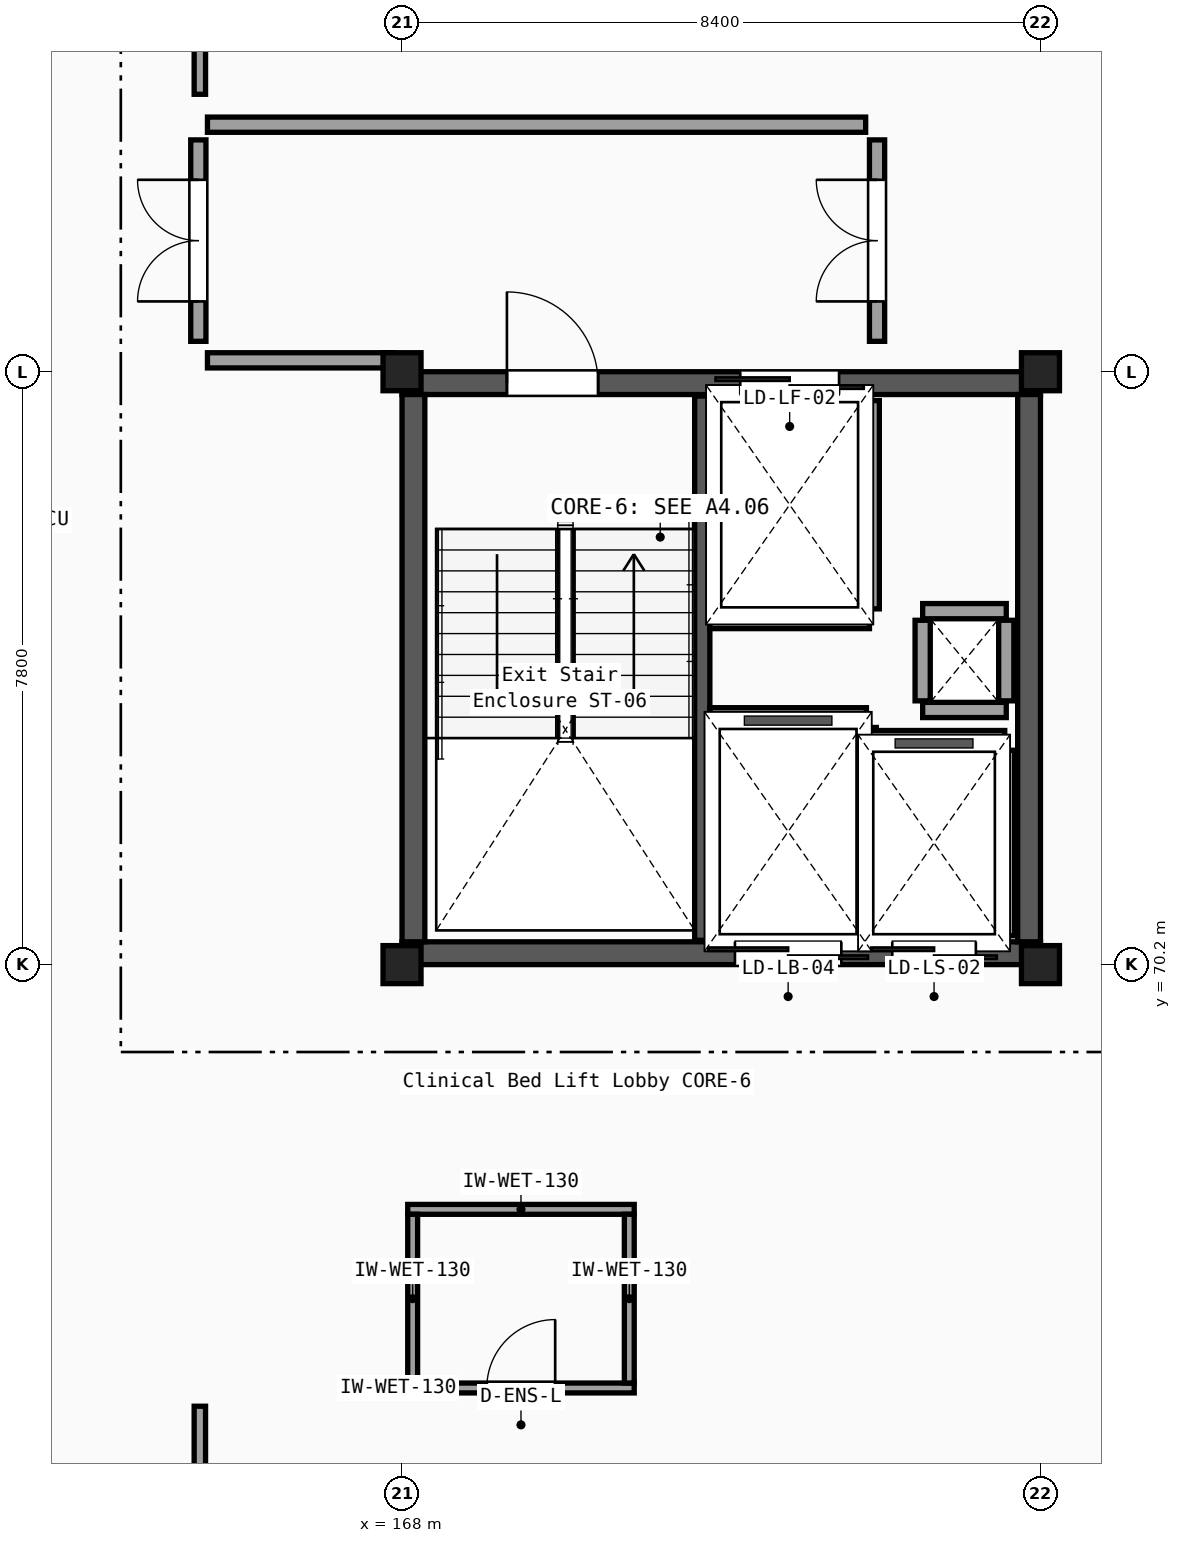
"""IFC4 building model, lengths in metres.
Left out: names, types, materials, properties, quantities, classifications, styles, units other than length and angle.
Written with IfcOpenShell. Run it as: python <this file> out.ifc"""

import sys

from ifc_helpers import new_model, si_unit, direction, frame, frame_2d, origin, origin_2d, place, context, subcontext, project, spatial, rectangle, i_section, extrude, element, fill, save


model = new_model("IFC4")
c1 = context("Model", 3, precision=1e-05, world=origin(), true_north=direction((0.0, 1.0)))
c2 = subcontext(c1, "Body", "Model", "MODEL_VIEW")
j1 = project(units=[si_unit("LENGTHUNIT", "METRE"), si_unit("PLANEANGLEUNIT", "RADIAN")], contexts=[c1])
p1 = place(None, origin())
s1 = spatial("IfcSite", under=j1, at=p1, CompositionType="ELEMENT")
p2 = place(p1, origin())
s2 = spatial("IfcBuilding", under=s1, at=p2, CompositionType="ELEMENT")
p3 = place(p2, frame((0.0, 0.0, 14.85)))
s3 = spatial("IfcBuildingStorey", under=s2, at=p3, CompositionType="ELEMENT", Elevation=14.85)
for number, where, z_axis, x_axis in (
    (1, (168.0, 70.2, 0.0), (0.0, 0.0, 1.0), (1.0, 0.0, 0.0)),
    (2, (168.0, 78.0, 0.0), (0.0, 0.0, 1.0), (1.0, 0.0, 0.0)),
    (3, (176.4, 70.2, 0.0), (0.0, 0.0, 1.0), (1.0, 0.0, 0.0)),
    (4, (176.4, 78.0, 0.0), (0.0, 0.0, 1.0), (1.0, 0.0, 0.0)),
):
    element("IfcColumn", number, at=place(p3, frame(where, z_axis=z_axis, x_axis=x_axis)), inside=s3, PredefinedType="COLUMN", context=c2, shape_type="SweptSolid", body=[
        extrude(i_section(OverallWidth=0.3, OverallDepth=0.5, WebThickness=0.014, FlangeThickness=0.028, FilletRadius=0.027, at=origin_2d()), origin(), (0.0, 0.0, 1.0), 4.05),
    ])
p4 = place(p3, frame((168.0, 70.35, 0.0), z_axis=(0.0, 0.0, 1.0), x_axis=(1.0, 0.0, 0.0)))
e5 = element("IfcWall", 5, at=p4, inside=s3, PredefinedType="SHEAR", context=c2, shape_type="SweptSolid", body=[
    extrude(rectangle(XDim=8.4, YDim=0.3, at=frame_2d((4.2, 0.0))), origin(), (0.0, 0.0, 1.0), 3.81),
])
p5 = place(p4, frame((4.38, 0.0, 0.0)))
e6 = element("IfcOpeningElement", 6, at=p5, cuts=e5, PredefinedType="OPENING", context=c2, shape_type="SweptSolid", body=[
    extrude(rectangle(XDim=1.4, YDim=2.2, at=frame_2d((0.7, 1.1))), frame((0.0, 0.16, 0.0), z_axis=(0.0, -1.0, 0.0), x_axis=(1.0, 0.0, 0.0)), (0.0, 0.0, 1.0), 0.32),
])
p6 = place(p4, frame((6.45, 0.0, 0.0)))
e7 = element("IfcOpeningElement", 7, at=p6, cuts=e5, PredefinedType="OPENING", context=c2, shape_type="SweptSolid", body=[
    extrude(rectangle(XDim=1.1, YDim=2.15, at=frame_2d((0.55, 1.075))), frame((0.0, 0.16, 0.0), z_axis=(0.0, -1.0, 0.0), x_axis=(1.0, 0.0, 0.0)), (0.0, 0.0, 1.0), 0.32),
])
p7 = place(p3, frame((168.0, 77.85, 0.0), z_axis=(0.0, 0.0, 1.0), x_axis=(1.0, 0.0, 0.0)))
e8 = element("IfcWall", 8, at=p7, inside=s3, PredefinedType="SHEAR", context=c2, shape_type="SweptSolid", body=[
    extrude(rectangle(XDim=8.4, YDim=0.3, at=frame_2d((4.2, 0.0))), origin(), (0.0, 0.0, 1.0), 3.81),
])
p8 = place(p7, frame((1.38, 0.0, 0.0)))
e9 = element("IfcOpeningElement", 9, at=p8, cuts=e8, PredefinedType="OPENING", context=c2, shape_type="SweptSolid", body=[
    extrude(rectangle(XDim=1.2, YDim=2.15, at=frame_2d((0.6, 1.075))), frame((0.0, 0.16, 0.0), z_axis=(0.0, -1.0, 0.0), x_axis=(1.0, 0.0, 0.0)), (0.0, 0.0, 1.0), 0.32),
])
p9 = place(p7, frame((4.45, 0.0, 0.0)))
e10 = element("IfcOpeningElement", 10, at=p9, cuts=e8, PredefinedType="OPENING", context=c2, shape_type="SweptSolid", body=[
    extrude(rectangle(XDim=1.3, YDim=2.2, at=frame_2d((0.65, 1.1))), frame((0.0, 0.16, 0.0), z_axis=(0.0, -1.0, 0.0), x_axis=(1.0, 0.0, 0.0)), (0.0, 0.0, 1.0), 0.32),
])
for number, where, z_axis, x_axis in (
    (11, (168.15, 70.5, 0.0), (0.0, 0.0, 1.0), (0.0, 1.0, 0.0)),
    (12, (176.25, 70.5, 0.0), (0.0, 0.0, 1.0), (0.0, 1.0, 0.0)),
):
    element("IfcWall", number, at=place(p3, frame(where, z_axis=z_axis, x_axis=x_axis)), inside=s3, PredefinedType="SHEAR", context=c2, shape_type="SweptSolid", body=[
        extrude(rectangle(XDim=7.2, YDim=0.3, at=frame_2d((3.6, 0.0))), origin(), (0.0, 0.0, 1.0), 3.81),
    ])
p10 = place(p3, frame((171.95, 70.52, 0.0), z_axis=(0.0, 0.0, 1.0), x_axis=(0.0, 1.0, 0.0)))
e13 = element("IfcWall", 13, at=p10, inside=s3, PredefinedType="SHEAR", context=c2, shape_type="SweptSolid", body=[
    extrude(rectangle(XDim=7.16, YDim=0.2, at=frame_2d((3.58, 0.0))), origin(), (0.0, 0.0, 1.0), 3.81),
])
for number, where, z_axis, x_axis in (
    (14, (174.85, 73.55, 0.0), (0.0, 0.0, 1.0), (1.0, 0.0, 0.0)),
    (15, (174.85, 74.85, 0.0), (0.0, 0.0, 1.0), (1.0, 0.0, 0.0)),
):
    element("IfcWall", number, at=place(p3, frame(where, z_axis=z_axis, x_axis=x_axis)), inside=s3, PredefinedType="PARTITIONING", context=c2, shape_type="SweptSolid", body=[
        extrude(rectangle(XDim=1.1, YDim=0.2, at=frame_2d((0.55, 0.0))), origin(), (0.0, 0.0, 1.0), 3.35),
    ])
for number, where, z_axis, x_axis in (
    (16, (174.85, 73.67, 0.0), (0.0, 0.0, 1.0), (0.0, 1.0, 0.0)),
    (17, (175.95, 73.67, 0.0), (0.0, 0.0, 1.0), (0.0, 1.0, 0.0)),
):
    element("IfcWall", number, at=place(p3, frame(where, z_axis=z_axis, x_axis=x_axis)), inside=s3, PredefinedType="PARTITIONING", context=c2, shape_type="SweptSolid", body=[
        extrude(rectangle(XDim=1.06, YDim=0.2, at=frame_2d((0.53, 0.0))), origin(), (0.0, 0.0, 1.0), 3.35),
    ])
p11 = place(p3, frame((174.18, 74.88, 0.0), z_axis=(0.0, 0.0, 1.0), x_axis=(0.0, 1.0, 0.0)))
e18 = element("IfcWall", 18, at=p11, inside=s3, PredefinedType="PARTITIONING", context=c2, shape_type="SweptSolid", body=[
    extrude(rectangle(XDim=2.74, YDim=0.2, at=frame_2d((1.37, 0.0))), origin(), (0.0, 0.0, 1.0), 3.35),
])
p12 = place(p3, frame((172.05, 74.72, 0.0), z_axis=(0.0, 0.0, 1.0), x_axis=(1.0, 0.0, 0.0)))
e19 = element("IfcWall", 19, at=p12, inside=s3, PredefinedType="PARTITIONING", context=c2, shape_type="SweptSolid", body=[
    extrude(rectangle(XDim=2.1, YDim=0.2, at=frame_2d((1.05, 0.0))), origin(), (0.0, 0.0, 1.0), 3.35),
])
p13 = place(p3, frame((174.14, 70.58, 0.0), z_axis=(0.0, 0.0, 1.0), x_axis=(0.0, 1.0, 0.0)))
e20 = element("IfcWall", 20, at=p13, inside=s3, PredefinedType="PARTITIONING", context=c2, shape_type="SweptSolid", body=[
    extrude(rectangle(XDim=2.74, YDim=0.2, at=frame_2d((1.37, 0.0))), origin(), (0.0, 0.0, 1.0), 3.35),
])
p14 = place(p3, frame((172.05, 73.48, 0.0), z_axis=(0.0, 0.0, 1.0), x_axis=(1.0, 0.0, 0.0)))
e21 = element("IfcWall", 21, at=p14, inside=s3, PredefinedType="PARTITIONING", context=c2, shape_type="SweptSolid", body=[
    extrude(rectangle(XDim=2.06, YDim=0.2, at=frame_2d((1.03, 0.0))), origin(), (0.0, 0.0, 1.0), 3.35),
])
p15 = place(p3, frame((175.96, 70.58, 0.0), z_axis=(0.0, 0.0, 1.0), x_axis=(0.0, 1.0, 0.0)))
e22 = element("IfcWall", 22, at=p15, inside=s3, PredefinedType="PARTITIONING", context=c2, shape_type="SweptSolid", body=[
    extrude(rectangle(XDim=2.44, YDim=0.2, at=frame_2d((1.22, 0.0))), origin(), (0.0, 0.0, 1.0), 3.35),
])
p16 = place(p3, frame((174.07, 73.18, 0.0), z_axis=(0.0, 0.0, 1.0), x_axis=(1.0, 0.0, 0.0)))
e23 = element("IfcWall", 23, at=p16, inside=s3, PredefinedType="PARTITIONING", context=c2, shape_type="SweptSolid", body=[
    extrude(rectangle(XDim=1.86, YDim=0.2, at=frame_2d((0.93, 0.0))), origin(), (0.0, 0.0, 1.0), 3.35),
])
p17 = place(p3, frame((165.44, 78.15, 0.0), z_axis=(0.0, 0.0, 1.0), x_axis=(1.0, 0.0, 0.0)))
e24 = element("IfcWall", 24, at=p17, inside=s3, PredefinedType="PARTITIONING", context=c2, shape_type="SweptSolid", body=[
    extrude(rectangle(XDim=2.44, YDim=0.2, at=frame_2d((1.22, 0.0))), origin(), (0.0, 0.0, 1.0), 3.35),
])
p18 = place(p3, frame((165.44, 81.25, 0.0), z_axis=(0.0, 0.0, 1.0), x_axis=(1.0, 0.0, 0.0)))
e25 = element("IfcWall", 25, at=p18, inside=s3, PredefinedType="PARTITIONING", context=c2, shape_type="SweptSolid", body=[
    extrude(rectangle(XDim=8.66, YDim=0.2, at=frame_2d((4.33, 0.0))), origin(), (0.0, 0.0, 1.0), 3.35),
])
p19 = place(p3, frame((165.32, 78.4, 0.0), z_axis=(0.0, 0.0, 1.0), x_axis=(0.0, 1.0, 0.0)))
e26 = element("IfcWall", 26, at=p19, inside=s3, PredefinedType="PARTITIONING", context=c2, shape_type="SweptSolid", body=[
    extrude(rectangle(XDim=2.65, YDim=0.2, at=frame_2d((1.325, 0.0))), origin(), (0.0, 0.0, 1.0), 3.35),
])
p20 = place(p19, frame((0.525, 0.0, 0.0)))
e27 = element("IfcOpeningElement", 27, at=p20, cuts=e26, PredefinedType="OPENING", context=c2, shape_type="SweptSolid", body=[
    extrude(rectangle(XDim=1.6, YDim=2.2, at=frame_2d((0.8, 1.1))), frame((0.0, 0.11, 0.0), z_axis=(0.0, -1.0, 0.0), x_axis=(1.0, 0.0, 0.0)), (0.0, 0.0, 1.0), 0.22),
])
p21 = place(p3, frame((174.25, 78.4, 0.0), z_axis=(0.0, 0.0, 1.0), x_axis=(0.0, 1.0, 0.0)))
e28 = element("IfcWall", 28, at=p21, inside=s3, PredefinedType="PARTITIONING", context=c2, shape_type="SweptSolid", body=[
    extrude(rectangle(XDim=2.65, YDim=0.2, at=frame_2d((1.325, 0.0))), origin(), (0.0, 0.0, 1.0), 3.35),
])
p22 = place(p21, frame((0.525, 0.0, 0.0)))
e29 = element("IfcOpeningElement", 29, at=p22, cuts=e28, PredefinedType="OPENING", context=c2, shape_type="SweptSolid", body=[
    extrude(rectangle(XDim=1.6, YDim=2.2, at=frame_2d((0.8, 1.1))), frame((0.0, 0.11, 0.0), z_axis=(0.0, -1.0, 0.0), x_axis=(1.0, 0.0, 0.0)), (0.0, 0.0, 1.0), 0.22),
])
p23 = place(p3, frame((165.34, 58.25, 0.0), z_axis=(0.0, 0.0, 1.0), x_axis=(0.0, 1.0, 0.0)))
e30 = element("IfcWall", 30, at=p23, inside=s3, PredefinedType="PARTITIONING", context=c2, shape_type="SweptSolid", body=[
    extrude(rectangle(XDim=6.14, YDim=0.15, at=frame_2d((3.07, 0.0))), origin(), (0.0, 0.0, 1.0), 3.35),
])
p24 = place(p23, frame((2.37, 0.0, 0.0)))
e31 = element("IfcOpeningElement", 31, at=p24, cuts=e30, PredefinedType="OPENING", context=c2, shape_type="SweptSolid", body=[
    extrude(rectangle(XDim=1.4, YDim=2.2, at=frame_2d((0.7, 1.1))), frame((0.0, 0.085, 0.0), z_axis=(0.0, -1.0, 0.0), x_axis=(1.0, 0.0, 0.0)), (0.0, 0.0, 1.0), 0.17),
])
p25 = place(p3, frame((168.075, 64.63, 0.0), z_axis=(0.0, 0.0, 1.0), x_axis=(1.0, 0.0, 0.0)))
e32 = element("IfcWall", 32, at=p25, inside=s3, PredefinedType="PARTITIONING", context=c2, shape_type="SweptSolid", body=[
    extrude(rectangle(XDim=2.98, YDim=0.13, at=frame_2d((1.49, 0.0))), origin(), (0.0, 0.0, 1.0), 3.48),
])
p26 = place(p25, frame((1.04, 0.0, 0.0)))
e33 = element("IfcOpeningElement", 33, at=p26, cuts=e32, PredefinedType="OPENING", context=c2, shape_type="SweptSolid", body=[
    extrude(rectangle(XDim=0.9, YDim=2.1, at=frame_2d((0.45, 1.05))), frame((0.0, 0.075, 0.0), z_axis=(0.0, -1.0, 0.0), x_axis=(1.0, 0.0, 0.0)), (0.0, 0.0, 1.0), 0.15),
])
p27 = place(p3, frame((168.075, 66.98, 0.0), z_axis=(0.0, 0.0, 1.0), x_axis=(1.0, 0.0, 0.0)))
e34 = element("IfcWall", 34, at=p27, inside=s3, PredefinedType="PARTITIONING", context=c2, shape_type="SweptSolid", body=[
    extrude(rectangle(XDim=2.98, YDim=0.13, at=frame_2d((1.49, 0.0))), origin(), (0.0, 0.0, 1.0), 3.48),
])
p28 = place(p3, frame((168.14, 64.695, 0.0), z_axis=(0.0, 0.0, 1.0), x_axis=(0.0, 1.0, 0.0)))
e35 = element("IfcWall", 35, at=p28, inside=s3, PredefinedType="PARTITIONING", context=c2, shape_type="SweptSolid", body=[
    extrude(rectangle(XDim=2.22, YDim=0.13, at=frame_2d((1.11, 0.0))), origin(), (0.0, 0.0, 1.0), 3.48),
])
p29 = place(p3, frame((170.99, 64.695, 0.0), z_axis=(0.0, 0.0, 1.0), x_axis=(0.0, 1.0, 0.0)))
e36 = element("IfcWall", 36, at=p29, inside=s3, PredefinedType="PARTITIONING", context=c2, shape_type="SweptSolid", body=[
    extrude(rectangle(XDim=2.22, YDim=0.13, at=frame_2d((1.11, 0.0))), origin(), (0.0, 0.0, 1.0), 3.77),
])
p30 = place(p3, frame((165.34, 81.65, 0.0), z_axis=(0.0, 0.0, 1.0), x_axis=(0.0, 1.0, 0.0)))
e37 = element("IfcWall", 37, at=p30, inside=s3, PredefinedType="PARTITIONING", context=c2, shape_type="SweptSolid", body=[
    extrude(rectangle(XDim=13.99, YDim=0.15, at=frame_2d((6.995, 0.0))), origin(), (0.0, 0.0, 1.0), 3.35),
])
p31 = place(p30, frame((6.145, 0.0, 0.0)))
e38 = element("IfcOpeningElement", 38, at=p31, cuts=e37, PredefinedType="OPENING", context=c2, shape_type="SweptSolid", body=[
    extrude(rectangle(XDim=1.7, YDim=2.3, at=frame_2d((0.85, 1.15))), frame((0.0, 0.085, 0.0), z_axis=(0.0, -1.0, 0.0), x_axis=(1.0, 0.0, 0.0)), (0.0, 0.0, 1.0), 0.17),
])
p32 = place(p8, origin())
e39 = element("IfcDoor", 39, at=p32, inside=s3, OperationType="SINGLE_SWING_LEFT", PredefinedType="DOOR", context=c2, shape_type="SweptSolid", body=[
    extrude(rectangle(XDim=1.2, YDim=2.15, at=frame_2d((0.6, 1.075))), frame((0.0, 0.025, 0.0), z_axis=(0.0, -1.0, 0.0), x_axis=(1.0, 0.0, 0.0)), (0.0, 0.0, 1.0), 0.05),
])
fill(e9, e39)
p33 = place(p9, origin())
e40 = element("IfcDoor", 40, at=p33, inside=s3, OperationType="DOUBLE_DOOR_SLIDING", PredefinedType="DOOR", context=c2, shape_type="SweptSolid", body=[
    extrude(rectangle(XDim=1.3, YDim=2.2, at=frame_2d((0.65, 1.1))), frame((0.0, 0.025, 0.0), z_axis=(0.0, -1.0, 0.0), x_axis=(1.0, 0.0, 0.0)), (0.0, 0.0, 1.0), 0.05),
])
fill(e10, e40)
p34 = place(p5, origin())
e41 = element("IfcDoor", 41, at=p34, inside=s3, OperationType="DOUBLE_DOOR_SLIDING", PredefinedType="DOOR", context=c2, shape_type="SweptSolid", body=[
    extrude(rectangle(XDim=1.4, YDim=2.2, at=frame_2d((0.7, 1.1))), frame((0.0, 0.025, 0.0), z_axis=(0.0, -1.0, 0.0), x_axis=(1.0, 0.0, 0.0)), (0.0, 0.0, 1.0), 0.05),
])
fill(e6, e41)
p35 = place(p6, origin())
e42 = element("IfcDoor", 42, at=p35, inside=s3, OperationType="DOUBLE_DOOR_SLIDING", PredefinedType="DOOR", context=c2, shape_type="SweptSolid", body=[
    extrude(rectangle(XDim=1.1, YDim=2.15, at=frame_2d((0.55, 1.075))), frame((0.0, 0.025, 0.0), z_axis=(0.0, -1.0, 0.0), x_axis=(1.0, 0.0, 0.0)), (0.0, 0.0, 1.0), 0.05),
])
fill(e7, e42)
p36 = place(p20, origin())
e43 = element("IfcDoor", 43, at=p36, inside=s3, OperationType="DOUBLE_DOOR_SINGLE_SWING", PredefinedType="DOOR", context=c2, shape_type="SweptSolid", body=[
    extrude(rectangle(XDim=1.6, YDim=2.2, at=frame_2d((0.8, 1.1))), frame((0.0, 0.025, 0.0), z_axis=(0.0, -1.0, 0.0), x_axis=(1.0, 0.0, 0.0)), (0.0, 0.0, 1.0), 0.05),
])
fill(e27, e43)
p37 = place(p22, origin())
e44 = element("IfcDoor", 44, at=p37, inside=s3, OperationType="DOUBLE_DOOR_SINGLE_SWING", PredefinedType="DOOR", context=c2, shape_type="SweptSolid", body=[
    extrude(rectangle(XDim=1.6, YDim=2.2, at=frame_2d((0.8, 1.1))), frame((0.0, 0.025, 0.0), z_axis=(0.0, -1.0, 0.0), x_axis=(1.0, 0.0, 0.0)), (0.0, 0.0, 1.0), 0.05),
])
fill(e29, e44)
p38 = place(p26, origin())
e45 = element("IfcDoor", 45, at=p38, inside=s3, OperationType="SINGLE_SWING_RIGHT", PredefinedType="DOOR", context=c2, shape_type="SweptSolid", body=[
    extrude(rectangle(XDim=0.9, YDim=2.1, at=frame_2d((0.45, 1.05))), frame((0.0, 0.025, 0.0), z_axis=(0.0, -1.0, 0.0), x_axis=(1.0, 0.0, 0.0)), (0.0, 0.0, 1.0), 0.05),
])
fill(e33, e45)
save(model, sys.argv[1])
